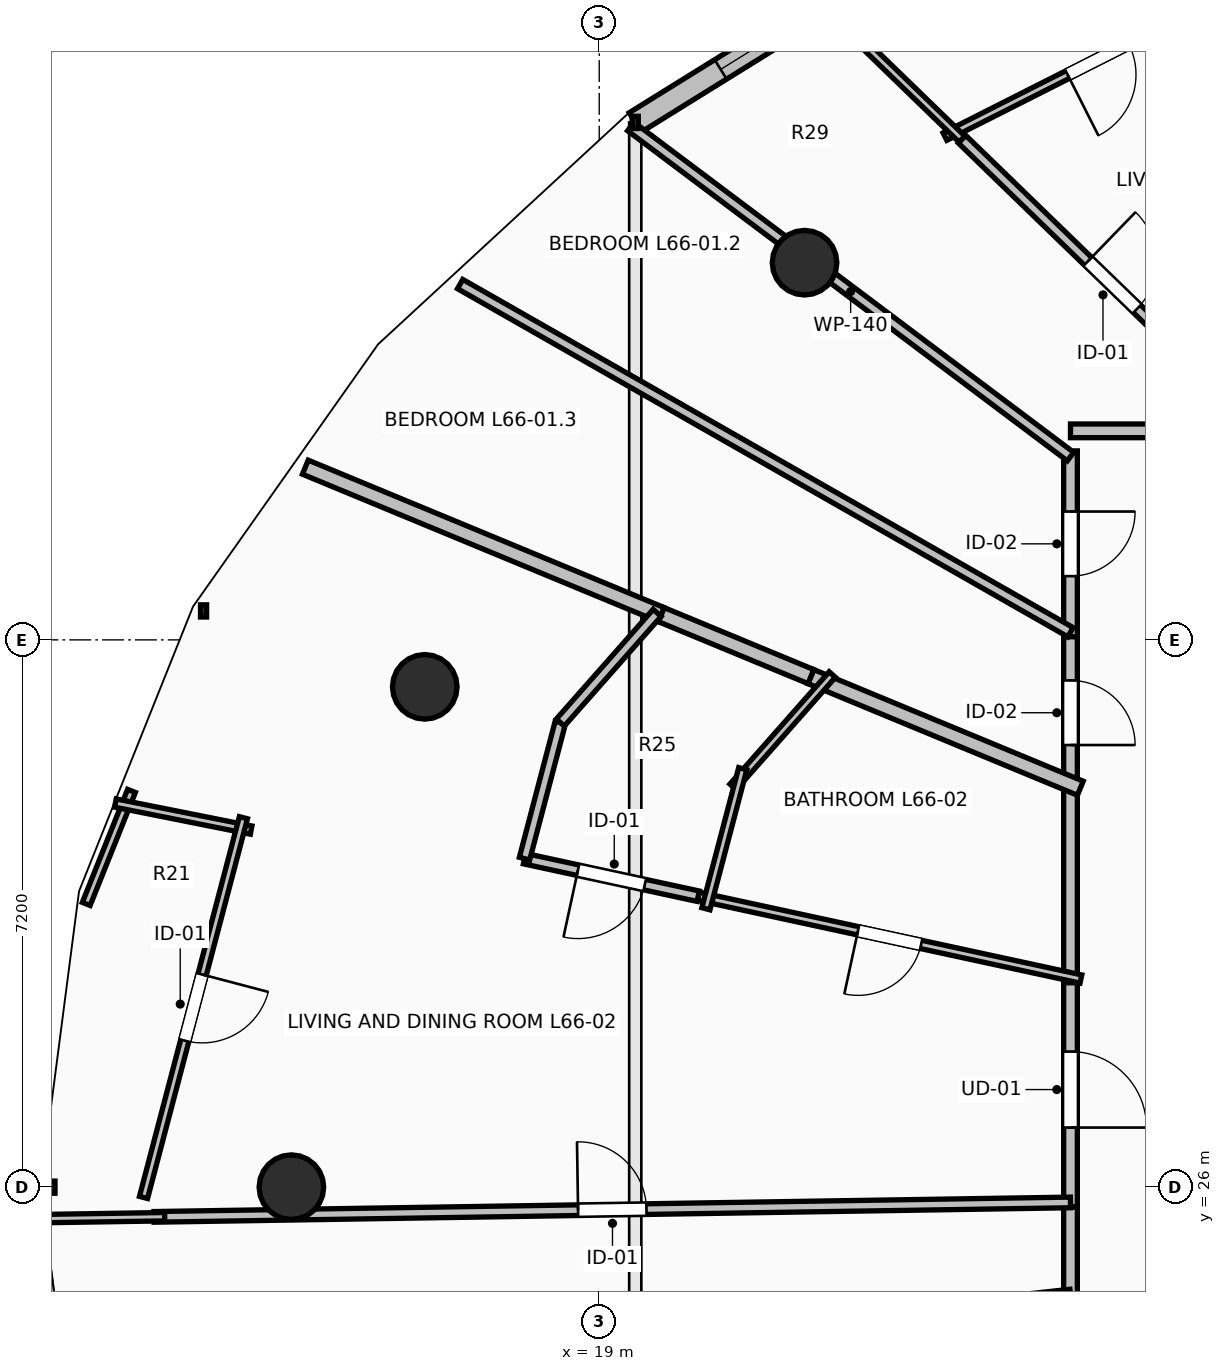
"""IFC4 building model, lengths in metres.
Left out: names, types, materials, properties, quantities, classifications, styles, units other than length and angle.
Written with IfcOpenShell. Run it as: python <this file> out.ifc"""

import sys

from ifc_helpers import new_model, si_unit, direction, frame, frame_2d, origin, origin_2d, place, context, subcontext, project, spatial, rectangle, circle, extrude, element, fill, save


model = new_model("IFC4")
c1 = context("Model", 3, precision=1e-05, world=origin(), true_north=direction((0.0, 1.0)))
c2 = subcontext(c1, "Body", "Model", "MODEL_VIEW")
j1 = project(units=[si_unit("LENGTHUNIT", "METRE"), si_unit("PLANEANGLEUNIT", "RADIAN")], contexts=[c1])
p1 = place(None, origin())
s1 = spatial("IfcSite", under=j1, at=p1, CompositionType="ELEMENT")
p2 = place(p1, origin())
s2 = spatial("IfcBuilding", under=s1, at=p2, CompositionType="ELEMENT")
p3 = place(p2, frame((0.0, 0.0, 244.9)))
s3 = spatial("IfcBuildingStorey", under=s2, at=p3, CompositionType="ELEMENT", Elevation=244.9)
for number, where, z_axis, x_axis in (
    (1, (21.701, 38.162, 0.0), (0.0, 0.0, 1.0), (-0.707, 0.707, 0.0)),
    (2, (16.705, 32.582, 0.0), (0.0, 0.0, 1.0), (-0.924, 0.383, 0.0)),
    (3, (14.95, 26.0, 0.0), (0.0, 0.0, 1.0), (-1.0, 0.0, 0.0)),
):
    element("IfcColumn", number, at=place(p3, frame(where, z_axis=z_axis, x_axis=x_axis)), inside=s3, PredefinedType="COLUMN", context=c2, shape_type="SweptSolid", body=[
        extrude(circle(Radius=0.425, at=origin_2d()), origin(), (0.0, 0.0, 1.0), 3.55),
    ])
p4 = place(p3, frame((23.444, 42.471, 0.0), z_axis=(0.0, 0.0, 1.0), x_axis=(-0.849702323036, -0.527262707032, 0.0)))
e4 = element("IfcWall", 4, at=p4, inside=s3, PredefinedType="STANDARD", context=c2, shape_type="SweptSolid", body=[
    extrude(rectangle(XDim=4.672, YDim=0.3, at=frame_2d((2.336, 0.0))), origin(), (0.0, 0.0, 1.0), 3.29),
])
p5 = place(p4, frame((2.15, 0.0, 0.85)))
e5 = element("IfcOpeningElement", 5, at=p5, cuts=e4, PredefinedType="OPENING", context=c2, shape_type="SweptSolid", body=[
    extrude(rectangle(XDim=1.2, YDim=1.95, at=frame_2d((0.6, 0.975))), frame((0.0, 0.165, 0.0), z_axis=(0.0, -1.0, 0.0), x_axis=(1.0, 0.0, 0.0)), (0.0, 0.0, 1.0), 0.33),
])
p6 = place(p3, frame((27.646, 35.95, 0.0), z_axis=(0.0, 0.0, 1.0), x_axis=(-1.0, 0.0, 0.0)))
e6 = element("IfcWall", 6, at=p6, inside=s3, PredefinedType="PARTITIONING", context=c2, shape_type="SweptSolid", body=[
    extrude(rectangle(XDim=2.446, YDim=0.18, at=frame_2d((1.223, 0.0))), origin(), (0.0, 0.0, 1.0), 2.482),
])
p7 = place(p3, frame((25.2, 35.686, 0.0), z_axis=(0.0, 0.0, 1.0), x_axis=(0.0, -1.0, 0.0)))
e7 = element("IfcWall", 7, at=p7, inside=s3, PredefinedType="PARTITIONING", context=c2, shape_type="SweptSolid", body=[
    extrude(rectangle(XDim=2.445, YDim=0.18, at=frame_2d((1.223, 0.0))), origin(), (0.0, 0.0, 1.0), 2.482),
])
p8 = place(p7, frame((0.798, 0.0, 0.0)))
e8 = element("IfcOpeningElement", 8, at=p8, cuts=e7, PredefinedType="OPENING", context=c2, shape_type="SweptSolid", body=[
    extrude(rectangle(XDim=0.85, YDim=2.1, at=frame_2d((0.425, 1.05))), frame((0.0, 0.105, 0.0), z_axis=(0.0, -1.0, 0.0), x_axis=(1.0, 0.0, 0.0)), (0.0, 0.0, 1.0), 0.21),
])
p9 = place(p3, frame((25.2, 33.241, 0.0), z_axis=(0.0, 0.0, 1.0), x_axis=(0.0, -1.0, 0.0)))
e9 = element("IfcWall", 9, at=p9, inside=s3, PredefinedType="PARTITIONING", context=c2, shape_type="SweptSolid", body=[
    extrude(rectangle(XDim=1.999, YDim=0.18, at=frame_2d((1.0, 0.0))), origin(), (0.0, 0.0, 1.0), 3.022),
])
p10 = place(p9, frame((0.574, 0.0, 0.0)))
e10 = element("IfcOpeningElement", 10, at=p10, cuts=e9, PredefinedType="OPENING", context=c2, shape_type="SweptSolid", body=[
    extrude(rectangle(XDim=0.85, YDim=2.1, at=frame_2d((0.425, 1.05))), frame((0.0, 0.105, 0.0), z_axis=(0.0, -1.0, 0.0), x_axis=(1.0, 0.0, 0.0)), (0.0, 0.0, 1.0), 0.21),
])
p11 = place(p3, frame((25.2, 28.829, 0.0), z_axis=(0.0, 0.0, 1.0), x_axis=(0.0, -1.0, 0.0)))
e11 = element("IfcWall", 11, at=p11, inside=s3, PredefinedType="PARTITIONING", context=c2, shape_type="SweptSolid", body=[
    extrude(rectangle(XDim=3.09, YDim=0.18, at=frame_2d((1.545, 0.0))), origin(), (0.0, 0.0, 1.0), 2.482),
])
p12 = place(p11, frame((1.045, 0.0, 0.0)))
e12 = element("IfcOpeningElement", 12, at=p12, cuts=e11, PredefinedType="OPENING", context=c2, shape_type="SweptSolid", body=[
    extrude(rectangle(XDim=1.0, YDim=2.15, at=frame_2d((0.5, 1.075))), frame((0.0, 0.105, 0.0), z_axis=(0.0, -1.0, 0.0), x_axis=(1.0, 0.0, 0.0)), (0.0, 0.0, 1.0), 0.21),
])
p13 = place(p3, frame((25.2, 31.382, 0.0), z_axis=(0.0, 0.0, 1.0), x_axis=(0.0, -1.0, 0.0)))
e13 = element("IfcWall", 13, at=p13, inside=s3, PredefinedType="PARTITIONING", context=c2, shape_type="SweptSolid", body=[
    extrude(rectangle(XDim=2.693, YDim=0.18, at=frame_2d((1.347, 0.0))), origin(), (0.0, 0.0, 1.0), 2.482),
])
p14 = place(p3, frame((25.2, 25.739, 0.0), z_axis=(0.0, 0.0, 1.0), x_axis=(0.0, -1.0, 0.0)))
e14 = element("IfcWall", 14, at=p14, inside=s3, PredefinedType="PARTITIONING", context=c2, shape_type="SweptSolid", body=[
    extrude(rectangle(XDim=1.212, YDim=0.18, at=frame_2d((0.606, 0.0))), origin(), (0.0, 0.0, 1.0), 3.29),
])
p15 = place(p3, frame((27.579, 41.858, 0.0), z_axis=(0.0, 0.0, 1.0), x_axis=(-0.892472689139, -0.451101428883, 0.0)))
e15 = element("IfcWall", 15, at=p15, inside=s3, PredefinedType="PARTITIONING", context=c2, shape_type="SweptSolid", body=[
    extrude(rectangle(XDim=4.516, YDim=0.11, at=frame_2d((2.258, 0.0))), origin(), (0.0, 0.0, 1.0), 3.29),
])
p16 = place(p15, frame((1.808, 0.0, 0.0)))
e16 = element("IfcOpeningElement", 16, at=p16, cuts=e15, PredefinedType="OPENING", context=c2, shape_type="SweptSolid", body=[
    extrude(rectangle(XDim=0.9, YDim=2.1, at=frame_2d((0.45, 1.05))), frame((0.0, 0.07, 0.0), z_axis=(0.0, -1.0, 0.0), x_axis=(1.0, 0.0, 0.0)), (0.0, 0.0, 1.0), 0.14),
])
p17 = place(p3, frame((23.773, 39.787, 0.0), z_axis=(0.0, 0.0, 1.0), x_axis=(-0.718131661866, 0.695907261225, 0.0)))
e17 = element("IfcWall", 17, at=p17, inside=s3, PredefinedType="PARTITIONING", context=c2, shape_type="SweptSolid", body=[
    extrude(rectangle(XDim=2.669, YDim=0.11, at=frame_2d((1.335, 0.0))), origin(), (0.0, 0.0, 1.0), 3.29),
])
p18 = place(p3, frame((23.773, 39.787, 0.0), z_axis=(0.0, 0.0, 1.0), x_axis=(0.718070058765, -0.695970826045, 0.0)))
e18 = element("IfcWall", 18, at=p18, inside=s3, PredefinedType="PARTITIONING", context=c2, shape_type="SweptSolid", body=[
    extrude(rectangle(XDim=5.513, YDim=0.14, at=frame_2d((2.756, 0.0))), origin(), (0.0, 0.0, 1.0), 2.482),
])
p19 = place(p18, frame((2.306, 0.0, 0.0)))
e19 = element("IfcOpeningElement", 19, at=p19, cuts=e18, PredefinedType="OPENING", context=c2, shape_type="SweptSolid", body=[
    extrude(rectangle(XDim=0.9, YDim=2.1, at=frame_2d((0.45, 1.05))), frame((0.0, 0.085, 0.0), z_axis=(0.0, -1.0, 0.0), x_axis=(1.0, 0.0, 0.0)), (0.0, 0.0, 1.0), 0.17),
])
p20 = place(p3, frame((19.415, 39.954, 0.0), z_axis=(0.0, 0.0, 1.0), x_axis=(0.799712355931, -0.600383334022, 0.0)))
e20 = element("IfcWall", 20, at=p20, inside=s3, PredefinedType="PARTITIONING", context=c2, shape_type="SweptSolid", body=[
    extrude(rectangle(XDim=7.234, YDim=0.14, at=frame_2d((3.617, 0.0))), origin(), (0.0, 0.0, 1.0), 2.482),
])
p21 = place(p3, frame((17.17, 37.881, 0.0), z_axis=(0.0, 0.0, 1.0), x_axis=(0.868639415668, -0.495444815844, 0.0)))
e21 = element("IfcWall", 21, at=p21, inside=s3, PredefinedType="PARTITIONING", context=c2, shape_type="SweptSolid", body=[
    extrude(rectangle(XDim=9.244, YDim=0.14, at=frame_2d((4.622, 0.0))), origin(), (0.0, 0.0, 1.0), 2.874),
])
p22 = place(p3, frame((15.133, 35.472, 0.0), z_axis=(0.0, 0.0, 1.0), x_axis=(0.923891232285, -0.382655185392, 0.0)))
e22 = element("IfcWall", 22, at=p22, inside=s3, PredefinedType="PARTITIONING", context=c2, shape_type="SweptSolid", body=[
    extrude(rectangle(XDim=5.07, YDim=0.2, at=frame_2d((2.535, 0.0))), origin(), (0.0, 0.0, 1.0), 2.874),
])
p23 = place(p3, frame((21.785, 32.717, 0.0), z_axis=(0.0, 0.0, 1.0), x_axis=(0.923878783617, -0.382685240352, 0.0)))
e23 = element("IfcWall", 23, at=p23, inside=s3, PredefinedType="PARTITIONING", context=c2, shape_type="SweptSolid", body=[
    extrude(rectangle(XDim=3.837, YDim=0.2, at=frame_2d((1.918, 0.0))), origin(), (0.0, 0.0, 1.0), 2.972),
])
p24 = place(p3, frame((19.817, 33.532, 0.0), z_axis=(0.0, 0.0, 1.0), x_axis=(0.92391905869, -0.382587993786, 0.0)))
e24 = element("IfcWall", 24, at=p24, inside=s3, PredefinedType="PARTITIONING", context=c2, shape_type="SweptSolid", body=[
    extrude(rectangle(XDim=2.13, YDim=0.2, at=frame_2d((1.065, 0.0))), origin(), (0.0, 0.0, 1.0), 2.972),
])
p25 = place(p3, frame((25.337, 28.738, 0.0), z_axis=(0.0, 0.0, 1.0), x_axis=(-0.977382932841, 0.211477191656, 0.0)))
e25 = element("IfcWall", 25, at=p25, inside=s3, PredefinedType="PARTITIONING", context=c2, shape_type="SweptSolid", body=[
    extrude(rectangle(XDim=5.151, YDim=0.11, at=frame_2d((2.576, 0.0))), origin(), (0.0, 0.0, 1.0), 2.482),
])
p26 = place(p25, frame((2.15, 0.0, 0.0)))
e26 = element("IfcOpeningElement", 26, at=p26, cuts=e25, PredefinedType="OPENING", context=c2, shape_type="SweptSolid", body=[
    extrude(rectangle(XDim=0.85, YDim=2.1, at=frame_2d((0.425, 1.05))), frame((0.0, 0.07, 0.0), z_axis=(0.0, -1.0, 0.0), x_axis=(1.0, 0.0, 0.0)), (0.0, 0.0, 1.0), 0.14),
])
p27 = place(p3, frame((12.846, 31.213, 0.0), z_axis=(0.0, 0.0, 1.0), x_axis=(-0.371522095559, -0.928424112414, 0.0)))
e27 = element("IfcWall", 27, at=p27, inside=s3, PredefinedType="PARTITIONING", context=c2, shape_type="SweptSolid", body=[
    extrude(rectangle(XDim=1.602, YDim=0.11, at=frame_2d((0.801, 0.0))), origin(), (0.0, 0.0, 1.0), 3.29),
])
p28 = place(p3, frame((12.635, 31.053, 0.0), z_axis=(0.0, 0.0, 1.0), x_axis=(0.980704252003, -0.195497238094, 0.0)))
e28 = element("IfcWall", 28, at=p28, inside=s3, PredefinedType="PARTITIONING", context=c2, shape_type="SweptSolid", body=[
    extrude(rectangle(XDim=1.821, YDim=0.11, at=frame_2d((0.91, 0.0))), origin(), (0.0, 0.0, 1.0), 3.29),
])
p29 = place(p3, frame((14.319, 30.86, 0.0), z_axis=(0.0, 0.0, 1.0), x_axis=(-0.254404898477, -0.967097796312, 0.0)))
e29 = element("IfcWall", 29, at=p29, inside=s3, PredefinedType="PARTITIONING", context=c2, shape_type="SweptSolid", body=[
    extrude(rectangle(XDim=5.166, YDim=0.11, at=frame_2d((2.583, 0.0))), origin(), (0.0, 0.0, 1.0), 3.29),
])
p30 = place(p29, frame((2.133, 0.0, 0.0)))
e30 = element("IfcOpeningElement", 30, at=p30, cuts=e29, PredefinedType="OPENING", context=c2, shape_type="SweptSolid", body=[
    extrude(rectangle(XDim=0.9, YDim=2.1, at=frame_2d((0.45, 1.05))), frame((0.0, 0.07, 0.0), z_axis=(0.0, -1.0, 0.0), x_axis=(1.0, 0.0, 0.0)), (0.0, 0.0, 1.0), 0.14),
])
p31 = place(p3, frame((20.302, 29.828, 0.0), z_axis=(0.0, 0.0, 1.0), x_axis=(-0.977387924942, 0.211454118377, 0.0)))
e31 = element("IfcWall", 31, at=p31, inside=s3, PredefinedType="PARTITIONING", context=c2, shape_type="SweptSolid", body=[
    extrude(rectangle(XDim=2.338, YDim=0.14, at=frame_2d((1.169, 0.0))), origin(), (0.0, 0.0, 1.0), 2.972),
])
p32 = place(p31, frame((0.719, 0.0, 0.0)))
e32 = element("IfcOpeningElement", 32, at=p32, cuts=e31, PredefinedType="OPENING", context=c2, shape_type="SweptSolid", body=[
    extrude(rectangle(XDim=0.9, YDim=2.1, at=frame_2d((0.45, 1.05))), frame((0.0, 0.085, 0.0), z_axis=(0.0, -1.0, 0.0), x_axis=(1.0, 0.0, 0.0)), (0.0, 0.0, 1.0), 0.17),
])
p33 = place(p3, frame((18.017, 30.322, 0.0), z_axis=(0.0, 0.0, 1.0), x_axis=(0.254434866485, 0.967089912426, 0.0)))
e33 = element("IfcWall", 33, at=p33, inside=s3, PredefinedType="PARTITIONING", context=c2, shape_type="SweptSolid", body=[
    extrude(rectangle(XDim=1.851, YDim=0.14, at=frame_2d((0.926, 0.0))), origin(), (0.0, 0.0, 1.0), 2.482),
])
p34 = place(p3, frame((18.488, 32.112, 0.0), z_axis=(0.0, 0.0, 1.0), x_axis=(0.661856531983, 0.749630529709, 0.0)))
e34 = element("IfcWall", 34, at=p34, inside=s3, PredefinedType="PARTITIONING", context=c2, shape_type="SweptSolid", body=[
    extrude(rectangle(XDim=1.925, YDim=0.14, at=frame_2d((0.962, 0.0))), origin(), (0.0, 0.0, 1.0), 2.482),
])
p35 = place(p3, frame((13.143, 25.609, 0.0), z_axis=(0.0, 0.0, 1.0), x_axis=(0.999875613351, 0.015772058374, 0.0)))
e35 = element("IfcWall", 35, at=p35, inside=s3, PredefinedType="PARTITIONING", context=c2, shape_type="SweptSolid", body=[
    extrude(rectangle(XDim=12.058, YDim=0.14, at=frame_2d((6.029, 0.0))), origin(), (0.0, 0.0, 1.0), 2.874),
])
p36 = place(p35, frame((5.579, 0.0, 0.0)))
e36 = element("IfcOpeningElement", 36, at=p36, cuts=e35, PredefinedType="OPENING", context=c2, shape_type="SweptSolid", body=[
    extrude(rectangle(XDim=0.9, YDim=2.1, at=frame_2d((0.45, 1.05))), frame((0.0, 0.085, 0.0), z_axis=(0.0, -1.0, 0.0), x_axis=(1.0, 0.0, 0.0)), (0.0, 0.0, 1.0), 0.17),
])
p37 = place(p3, frame((22.066, 32.744, 0.0), z_axis=(0.0, 0.0, 1.0), x_axis=(-0.662047420969, -0.749461948593, 0.0)))
e37 = element("IfcWall", 37, at=p37, inside=s3, PredefinedType="PARTITIONING", context=c2, shape_type="SweptSolid", body=[
    extrude(rectangle(XDim=1.972, YDim=0.11, at=frame_2d((0.986, 0.0))), origin(), (0.0, 0.0, 1.0), 2.972),
])
p38 = place(p3, frame((20.889, 31.506, 0.0), z_axis=(0.0, 0.0, 1.0), x_axis=(-0.254568935897, -0.967054629727, 0.0)))
e38 = element("IfcWall", 38, at=p38, inside=s3, PredefinedType="PARTITIONING", context=c2, shape_type="SweptSolid", body=[
    extrude(rectangle(XDim=1.906, YDim=0.11, at=frame_2d((0.953, 0.0))), origin(), (0.0, 0.0, 1.0), 2.482),
])
p39 = place(p3, frame((11.714, 25.587, 0.0), z_axis=(0.0, 0.0, 1.0), x_axis=(0.9998813462, 0.015404334465, 0.0)))
e39 = element("IfcWall", 39, at=p39, inside=s3, PredefinedType="PARTITIONING", context=c2, shape_type="SweptSolid", body=[
    extrude(rectangle(XDim=1.569, YDim=0.11, at=frame_2d((0.785, 0.0))), origin(), (0.0, 0.0, 1.0), 3.29),
])
p40 = place(p3, frame((12.172, 23.149, 0.0), z_axis=(0.0, 0.0, 1.0), x_axis=(0.993963433103, 0.109711866515, 0.0)))
e40 = element("IfcWall", 40, at=p40, inside=s3, PredefinedType="PARTITIONING", context=c2, shape_type="SweptSolid", body=[
    extrude(rectangle(XDim=13.107, YDim=0.14, at=frame_2d((6.553, 0.0))), origin(), (0.0, 0.0, 1.0), 2.874),
])
p41 = place(p5, origin())
e41 = element("IfcWindow", 41, at=p41, inside=s3, PartitioningType="SINGLE_PANEL", PredefinedType="WINDOW", context=c2, shape_type="SweptSolid", body=[
    extrude(rectangle(XDim=1.2, YDim=1.95, at=frame_2d((0.6, 0.975))), frame((0.0, 0.03, 0.0), z_axis=(0.0, -1.0, 0.0), x_axis=(1.0, 0.0, 0.0)), (0.0, 0.0, 1.0), 0.06),
])
fill(e5, e41)
p42 = place(p12, origin())
e42 = element("IfcDoor", 42, at=p42, inside=s3, OperationType="SINGLE_SWING_RIGHT", PredefinedType="DOOR", context=c2, shape_type="SweptSolid", body=[
    extrude(rectangle(XDim=1.0, YDim=2.15, at=frame_2d((0.5, 1.075))), frame((0.0, 0.025, 0.0), z_axis=(0.0, -1.0, 0.0), x_axis=(1.0, 0.0, 0.0)), (0.0, 0.0, 1.0), 0.05),
])
fill(e12, e42)
p43 = place(p16, origin())
e43 = element("IfcDoor", 43, at=p43, inside=s3, OperationType="SINGLE_SWING_RIGHT", PredefinedType="DOOR", context=c2, shape_type="SweptSolid", body=[
    extrude(rectangle(XDim=0.9, YDim=2.1, at=frame_2d((0.45, 1.05))), frame((0.0, 0.025, 0.0), z_axis=(0.0, -1.0, 0.0), x_axis=(1.0, 0.0, 0.0)), (0.0, 0.0, 1.0), 0.05),
])
fill(e16, e43)
p44 = place(p19, origin())
e44 = element("IfcDoor", 44, at=p44, inside=s3, OperationType="SINGLE_SWING_LEFT", PredefinedType="DOOR", context=c2, shape_type="SweptSolid", body=[
    extrude(rectangle(XDim=0.9, YDim=2.1, at=frame_2d((0.45, 1.05))), frame((0.0, 0.025, 0.0), z_axis=(0.0, -1.0, 0.0), x_axis=(1.0, 0.0, 0.0)), (0.0, 0.0, 1.0), 0.05),
])
fill(e19, e44)
p45 = place(p26, origin())
e45 = element("IfcDoor", 45, at=p45, inside=s3, OperationType="SINGLE_SWING_RIGHT", PredefinedType="DOOR", context=c2, shape_type="SweptSolid", body=[
    extrude(rectangle(XDim=0.85, YDim=2.1, at=frame_2d((0.425, 1.05))), frame((0.0, 0.025, 0.0), z_axis=(0.0, -1.0, 0.0), x_axis=(1.0, 0.0, 0.0)), (0.0, 0.0, 1.0), 0.05),
])
fill(e26, e45)
p46 = place(p30, origin())
e46 = element("IfcDoor", 46, at=p46, inside=s3, OperationType="SINGLE_SWING_LEFT", PredefinedType="DOOR", context=c2, shape_type="SweptSolid", body=[
    extrude(rectangle(XDim=0.9, YDim=2.1, at=frame_2d((0.45, 1.05))), frame((0.0, 0.025, 0.0), z_axis=(0.0, -1.0, 0.0), x_axis=(1.0, 0.0, 0.0)), (0.0, 0.0, 1.0), 0.05),
])
fill(e30, e46)
p47 = place(p32, origin())
e47 = element("IfcDoor", 47, at=p47, inside=s3, OperationType="SINGLE_SWING_RIGHT", PredefinedType="DOOR", context=c2, shape_type="SweptSolid", body=[
    extrude(rectangle(XDim=0.9, YDim=2.1, at=frame_2d((0.45, 1.05))), frame((0.0, 0.025, 0.0), z_axis=(0.0, -1.0, 0.0), x_axis=(1.0, 0.0, 0.0)), (0.0, 0.0, 1.0), 0.05),
])
fill(e32, e47)
p48 = place(p36, origin())
e48 = element("IfcDoor", 48, at=p48, inside=s3, OperationType="SINGLE_SWING_LEFT", PredefinedType="DOOR", context=c2, shape_type="SweptSolid", body=[
    extrude(rectangle(XDim=0.9, YDim=2.1, at=frame_2d((0.45, 1.05))), frame((0.0, 0.025, 0.0), z_axis=(0.0, -1.0, 0.0), x_axis=(1.0, 0.0, 0.0)), (0.0, 0.0, 1.0), 0.05),
])
fill(e36, e48)
p49 = place(p8, origin())
e49 = element("IfcDoor", 49, at=p49, inside=s3, OperationType="SINGLE_SWING_LEFT", PredefinedType="DOOR", context=c2, shape_type="SweptSolid", body=[
    extrude(rectangle(XDim=0.85, YDim=2.1, at=frame_2d((0.425, 1.05))), frame((0.0, 0.025, 0.0), z_axis=(0.0, -1.0, 0.0), x_axis=(1.0, 0.0, 0.0)), (0.0, 0.0, 1.0), 0.05),
])
fill(e8, e49)
p50 = place(p10, origin())
e50 = element("IfcDoor", 50, at=p50, inside=s3, OperationType="SINGLE_SWING_RIGHT", PredefinedType="DOOR", context=c2, shape_type="SweptSolid", body=[
    extrude(rectangle(XDim=0.85, YDim=2.1, at=frame_2d((0.425, 1.05))), frame((0.0, 0.025, 0.0), z_axis=(0.0, -1.0, 0.0), x_axis=(1.0, 0.0, 0.0)), (0.0, 0.0, 1.0), 0.05),
])
fill(e10, e50)
save(model, sys.argv[1])
